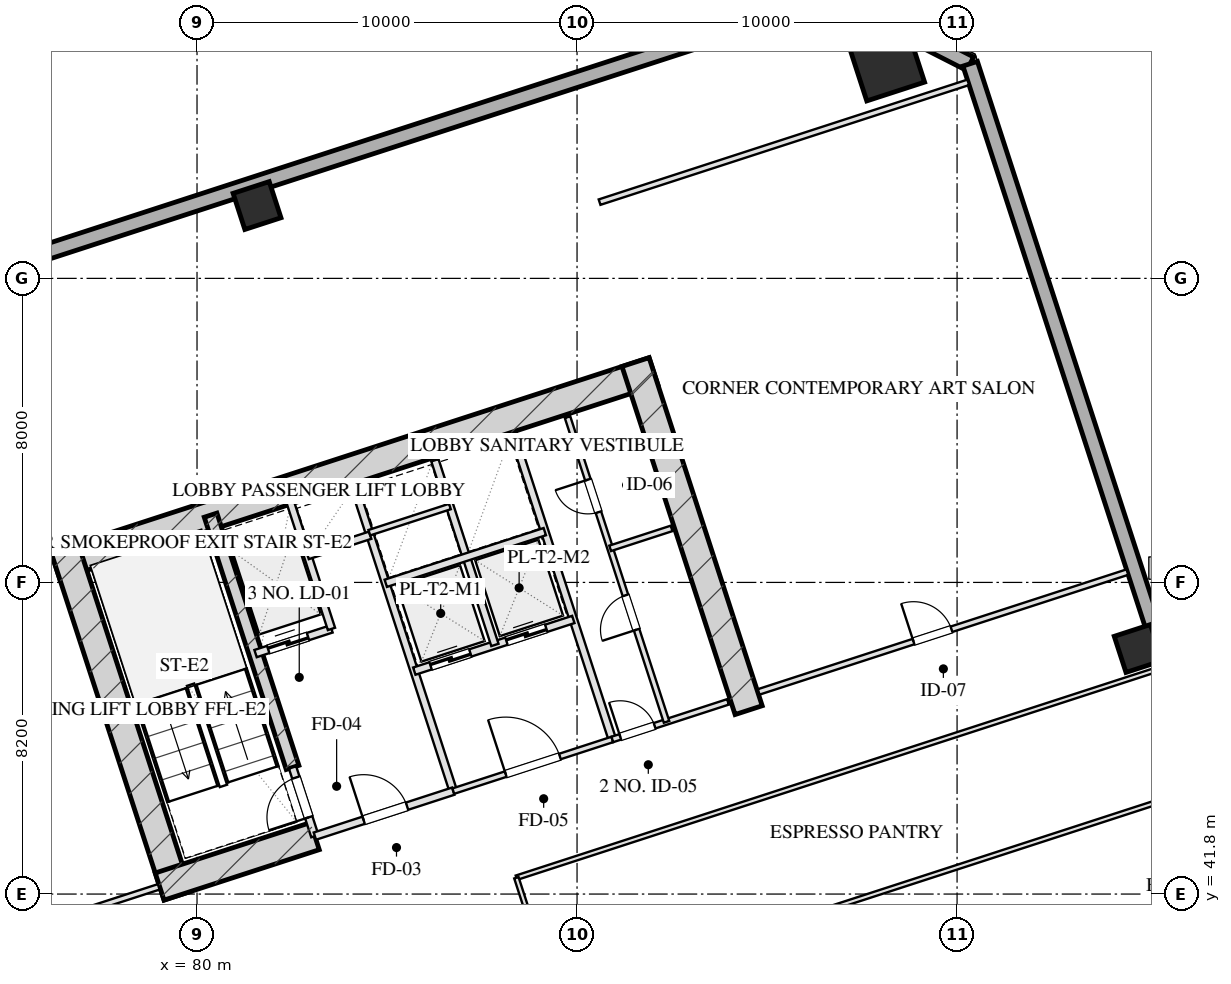
"""IFC4 building model, lengths in metres.
Left out: names, types, materials, properties, quantities, classifications, styles, units other than length and angle.
Written with IfcOpenShell. Run it as: python <this file> out.ifc"""

import sys

from ifc_helpers import new_model, si_unit, direction, frame, frame_2d, origin, origin_2d, place, context, subcontext, project, spatial, rectangle, hollow_rectangle, extrude, element, fill, save


model = new_model("IFC4")
c1 = context("Model", 3, precision=1e-05, world=origin(), true_north=direction((0.0, 1.0)))
c2 = subcontext(c1, "Body", "Model", "MODEL_VIEW")
j1 = project(units=[si_unit("LENGTHUNIT", "METRE"), si_unit("PLANEANGLEUNIT", "RADIAN")], contexts=[c1])
p1 = place(None, origin())
s1 = spatial("IfcSite", under=j1, at=p1, CompositionType="ELEMENT")
p2 = place(p1, origin())
s2 = spatial("IfcBuilding", under=s1, at=p2, CompositionType="ELEMENT")
p3 = place(p2, frame((0.0, 0.0, 57.5)))
s3 = spatial("IfcBuildingStorey", under=s2, at=p3, CompositionType="ELEMENT", Elevation=57.5)
p4 = place(p3, frame((76.272, 50.443, 0.0), z_axis=(0.0, 0.0, 1.0), x_axis=(0.951056072937, 0.309018358888, 0.0)))
e1 = element("IfcWall", 1, at=p4, inside=s3, PredefinedType="SHEAR", context=c2, shape_type="SweptSolid", body=[
    extrude(rectangle(XDim=16.55, YDim=0.75, at=frame_2d((8.275, 0.0))), origin(), (0.0, 0.0, 1.0), 3.45),
])
for number, where, z_axis, x_axis in (
    (2, (79.489, 41.756, 0.0), (0.0, 0.0, 1.0), (-0.309, 0.951, 0.0)),
    (3, (94.515, 46.639, 0.0), (0.0, 0.0, 1.0), (-0.309, 0.951, 0.0)),
):
    element("IfcWall", number, at=place(p3, frame(where, z_axis=z_axis, x_axis=x_axis)), inside=s3, PredefinedType="SHEAR", context=c2, shape_type="SweptSolid", body=[
        extrude(rectangle(XDim=9.63, YDim=0.75, at=frame_2d((4.815, 0.0))), origin(), (0.0, 0.0, 1.0), 3.45),
    ])
p5 = place(p3, frame((82.514, 45.131, 0.0), z_axis=(0.0, 0.0, 1.0), x_axis=(-0.308988790936, 0.951065679686, 0.0)))
e4 = element("IfcWall", 4, at=p5, inside=s3, PredefinedType="SHEAR", context=c2, shape_type="SweptSolid", body=[
    extrude(rectangle(XDim=6.98, YDim=0.35, at=frame_2d((3.49, 0.0))), origin(), (0.0, 0.0, 1.0), 3.45),
])
p6 = place(p3, frame((79.016, 41.997, 0.0), z_axis=(0.0, 0.0, 1.0), x_axis=(0.95106038264, 0.309005094736, 0.0)))
e5 = element("IfcWall", 5, at=p6, inside=s3, PredefinedType="SHEAR", context=c2, shape_type="SweptSolid", body=[
    extrude(rectangle(XDim=4.295, YDim=0.75, at=frame_2d((2.147, 0.0))), origin(), (0.0, 0.0, 1.0), 3.45),
])
p7 = place(p3, frame((98.137, 63.677, 0.0), z_axis=(0.0, 0.0, 1.0), x_axis=(0.951056516295, 0.309016994375, 0.0)))
e6 = element("IfcColumn", 6, at=p7, inside=s3, PredefinedType="COLUMN", context=c2, shape_type="SweptSolid", body=[
    extrude(hollow_rectangle(XDim=1.6, YDim=1.6, WallThickness=0.055, at=origin_2d()), origin(), (0.0, 0.0, 1.0), 3.451),
])
for number, where, z_axis, x_axis in (
    (7, (104.766, 48.261, 0.0), (0.0, 0.0, 1.0), (0.951, 0.309, 0.0)),
    (8, (81.579, 59.916, 0.0), (0.0, 0.0, 1.0), (0.951, 0.309, 0.0)),
):
    element("IfcColumn", number, at=place(p3, frame(where, z_axis=z_axis, x_axis=x_axis)), inside=s3, PredefinedType="COLUMN", context=c2, shape_type="SweptSolid", body=[
        extrude(hollow_rectangle(XDim=1.0, YDim=1.0, WallThickness=0.036, at=origin_2d()), origin(), (0.0, 0.0, 1.0), 3.451),
    ])
p8 = place(p3, frame((79.655, 4.352, 0.0), z_axis=(0.0, 0.0, 1.0), x_axis=(-0.309014526607, 0.951057318118, 0.0)))
e9 = element("IfcWall", 9, at=p8, inside=s3, PredefinedType="SOLIDWALL", context=c2, shape_type="SweptSolid", body=[
    extrude(rectangle(XDim=50.0, YDim=0.4, at=frame_2d((25.0, 0.0))), origin(), (0.0, 0.0, 1.0), 2.61),
])
p9 = place(p8, frame((17.35, 0.0, 0.75)))
e10 = element("IfcOpeningElement", 10, at=p9, cuts=e9, PredefinedType="OPENING", context=c2, shape_type="SweptSolid", body=[
    extrude(rectangle(XDim=2.5, YDim=1.46, at=frame_2d((1.25, 0.73))), frame((0.0, 0.21, 0.0), z_axis=(0.0, -1.0, 0.0), x_axis=(1.0, 0.0, 0.0)), (0.0, 0.0, 1.0), 0.42),
])
p10 = place(p8, frame((30.25, 0.0, 0.0)))
e11 = element("IfcOpeningElement", 11, at=p10, cuts=e9, PredefinedType="OPENING", context=c2, shape_type="SweptSolid", body=[
    extrude(rectangle(XDim=1.1, YDim=2.15, at=frame_2d((0.55, 1.075))), frame((0.0, 0.21, 0.0), z_axis=(0.0, -1.0, 0.0), x_axis=(1.0, 0.0, 0.0)), (0.0, 0.0, 1.0), 0.42),
])
p11 = place(p3, frame((66.002, 55.433, 0.0), z_axis=(0.0, 0.0, 1.0), x_axis=(0.951055939317, 0.309018770125, 0.0)))
e12 = element("IfcWall", 12, at=p11, inside=s3, PredefinedType="SOLIDWALL", context=c2, shape_type="SweptSolid", body=[
    extrude(rectangle(XDim=32.4, YDim=0.4, at=frame_2d((16.2, 0.0))), origin(), (0.0, 0.0, 1.0), 2.61),
])
p12 = place(p3, frame((96.816, 65.446, 0.0), z_axis=(0.0, 0.0, 1.0), x_axis=(0.890998089617, -0.454007053137, 0.0)))
e13 = element("IfcWall", 13, at=p12, inside=s3, PredefinedType="SOLIDWALL", context=c2, shape_type="SweptSolid", body=[
    extrude(rectangle(XDim=3.96, YDim=0.4, at=frame_2d((1.98, 0.0))), origin(), (0.0, 0.0, 1.0), 2.61),
])
p13 = place(p3, frame((100.345, 63.648, 0.0), z_axis=(0.0, 0.0, 1.0), x_axis=(0.309014526607, -0.951057318118, 0.0)))
e14 = element("IfcWall", 14, at=p13, inside=s3, PredefinedType="SOLIDWALL", context=c2, shape_type="SweptSolid", body=[
    extrude(rectangle(XDim=50.0, YDim=0.4, at=frame_2d((25.0, 0.0))), origin(), (0.0, 0.0, 1.0), 2.61),
])
p14 = place(p13, frame((21.85, 0.0, 0.0)))
e15 = element("IfcOpeningElement", 15, at=p14, cuts=e14, PredefinedType="OPENING", context=c2, shape_type="SweptSolid", body=[
    extrude(rectangle(XDim=1.1, YDim=2.15, at=frame_2d((0.55, 1.075))), frame((0.0, 0.21, 0.0), z_axis=(0.0, -1.0, 0.0), x_axis=(1.0, 0.0, 0.0)), (0.0, 0.0, 1.0), 0.42),
])
p15 = place(p3, frame((83.101, 43.324, 0.0), z_axis=(0.0, 0.0, 1.0), x_axis=(-0.309048298632, 0.951046344356, 0.0)))
e16 = element("IfcWall", 16, at=p15, inside=s3, PredefinedType="PARTITIONING", context=c2, shape_type="SweptSolid", body=[
    extrude(rectangle(XDim=1.9, YDim=0.2, at=frame_2d((0.95, 0.0))), origin(), (0.0, 0.0, 1.0), 3.175),
])
p16 = place(p15, frame((0.52, 0.0, 0.0)))
e17 = element("IfcOpeningElement", 17, at=p16, cuts=e16, PredefinedType="OPENING", context=c2, shape_type="SweptSolid", body=[
    extrude(rectangle(XDim=1.1, YDim=2.05, at=frame_2d((0.55, 1.025))), frame((0.0, 0.11, 0.0), z_axis=(0.0, -1.0, 0.0), x_axis=(1.0, 0.0, 0.0)), (0.0, 0.0, 1.0), 0.22),
])
p17 = place(p3, frame((86.743, 44.508, 0.0), z_axis=(0.0, 0.0, 1.0), x_axis=(-0.309016001439, 0.951056838919, 0.0)))
e18 = element("IfcWall", 18, at=p17, inside=s3, PredefinedType="PARTITIONING", context=c2, shape_type="SweptSolid", body=[
    extrude(rectangle(XDim=8.43, YDim=0.2, at=frame_2d((4.215, 0.0))), origin(), (0.0, 0.0, 1.0), 3.175),
])
p18 = place(p3, frame((83.101, 43.324, 0.0), z_axis=(0.0, 0.0, 1.0), x_axis=(0.951052804469, 0.309028417967, 0.0)))
e19 = element("IfcWall", 19, at=p18, inside=s3, PredefinedType="PARTITIONING", context=c2, shape_type="SweptSolid", body=[
    extrude(rectangle(XDim=3.83, YDim=0.2, at=frame_2d((1.915, 0.0))), origin(), (0.0, 0.0, 1.0), 3.175),
])
p19 = place(p18, frame((1.35, 0.0, 0.0)))
e20 = element("IfcOpeningElement", 20, at=p19, cuts=e19, PredefinedType="OPENING", context=c2, shape_type="SweptSolid", body=[
    extrude(rectangle(XDim=1.2, YDim=2.05, at=frame_2d((0.6, 1.025))), frame((0.0, 0.11, 0.0), z_axis=(0.0, -1.0, 0.0), x_axis=(1.0, 0.0, 0.0)), (0.0, 0.0, 1.0), 0.22),
])
p20 = place(p3, frame((81.54, 48.127, 0.0), z_axis=(0.0, 0.0, 1.0), x_axis=(0.951062257173, 0.308999325213, 0.0)))
e21 = element("IfcWall", 21, at=p20, inside=s3, PredefinedType="PARTITIONING", context=c2, shape_type="SweptSolid", body=[
    extrude(rectangle(XDim=2.1, YDim=0.2, at=frame_2d((1.05, 0.0))), origin(), (0.0, 0.0, 1.0), 3.175),
])
p21 = place(p20, frame((0.35, 0.0, 0.0)))
e22 = element("IfcOpeningElement", 22, at=p21, cuts=e21, PredefinedType="OPENING", context=c2, shape_type="SweptSolid", body=[
    extrude(rectangle(XDim=1.1, YDim=2.05, at=frame_2d((0.55, 1.025))), frame((0.0, 0.11, 0.0), z_axis=(0.0, -1.0, 0.0), x_axis=(1.0, 0.0, 0.0)), (0.0, 0.0, 1.0), 0.22),
])
p22 = place(p3, frame((83.538, 48.776, 0.0), z_axis=(0.0, 0.0, 1.0), x_axis=(-0.3089935693, 0.951064127245, 0.0)))
e23 = element("IfcWall", 23, at=p22, inside=s3, PredefinedType="PARTITIONING", context=c2, shape_type="SweptSolid", body=[
    extrude(rectangle(XDim=3.7, YDim=0.2, at=frame_2d((1.85, 0.0))), origin(), (0.0, 0.0, 1.0), 3.175),
])
p23 = place(p3, frame((82.91, 50.707, 0.0), z_axis=(0.0, 0.0, 1.0), x_axis=(0.951041328149, 0.309063734775, 0.0)))
e24 = element("IfcWall", 24, at=p23, inside=s3, PredefinedType="PARTITIONING", context=c2, shape_type="SweptSolid", body=[
    extrude(rectangle(XDim=1.73, YDim=0.2, at=frame_2d((0.865, 0.0))), origin(), (0.0, 0.0, 1.0), 3.175),
])
p24 = place(p3, frame((90.928, 45.868, 0.0), z_axis=(0.0, 0.0, 1.0), x_axis=(-0.309042196757, 0.951048327176, 0.0)))
e25 = element("IfcWall", 25, at=p24, inside=s3, PredefinedType="PARTITIONING", context=c2, shape_type="SweptSolid", body=[
    extrude(rectangle(XDim=8.43, YDim=0.2, at=frame_2d((4.215, 0.0))), origin(), (0.0, 0.0, 1.0), 3.175),
])
p25 = place(p3, frame((86.743, 44.508, 0.0), z_axis=(0.0, 0.0, 1.0), x_axis=(0.951063829732, 0.308994485023, 0.0)))
e26 = element("IfcWall", 26, at=p25, inside=s3, PredefinedType="PARTITIONING", context=c2, shape_type="SweptSolid", body=[
    extrude(rectangle(XDim=4.4, YDim=0.15, at=frame_2d((2.2, 0.0))), origin(), (0.0, 0.0, 1.0), 3.175),
])
p26 = place(p25, frame((1.45, 0.0, 0.0)))
e27 = element("IfcOpeningElement", 27, at=p26, cuts=e26, PredefinedType="OPENING", context=c2, shape_type="SweptSolid", body=[
    extrude(rectangle(XDim=1.5, YDim=2.05, at=frame_2d((0.75, 1.025))), frame((0.0, 0.085, 0.0), z_axis=(0.0, -1.0, 0.0), x_axis=(1.0, 0.0, 0.0)), (0.0, 0.0, 1.0), 0.17),
])
p27 = place(p3, frame((85.718, 47.666, 0.0), z_axis=(0.0, 0.0, 1.0), x_axis=(0.951058531764, 0.30901079133, 0.0)))
e28 = element("IfcWall", 28, at=p27, inside=s3, PredefinedType="PARTITIONING", context=c2, shape_type="SweptSolid", body=[
    extrude(rectangle(XDim=4.4, YDim=0.2, at=frame_2d((2.2, 0.0))), origin(), (0.0, 0.0, 1.0), 3.175),
])
p28 = place(p27, frame((0.45, 0.0, 0.0)))
e29 = element("IfcOpeningElement", 29, at=p28, cuts=e28, PredefinedType="OPENING", context=c2, shape_type="SweptSolid", body=[
    extrude(rectangle(XDim=1.1, YDim=2.05, at=frame_2d((0.55, 1.025))), frame((0.0, 0.11, 0.0), z_axis=(0.0, -1.0, 0.0), x_axis=(1.0, 0.0, 0.0)), (0.0, 0.0, 1.0), 0.22),
])
p29 = place(p27, frame((2.55, 0.0, 0.0)))
e30 = element("IfcOpeningElement", 30, at=p29, cuts=e28, PredefinedType="OPENING", context=c2, shape_type="SweptSolid", body=[
    extrude(rectangle(XDim=1.1, YDim=2.05, at=frame_2d((0.55, 1.025))), frame((0.0, 0.11, 0.0), z_axis=(0.0, -1.0, 0.0), x_axis=(1.0, 0.0, 0.0)), (0.0, 0.0, 1.0), 0.22),
])
p30 = place(p3, frame((87.838, 48.354, 0.0), z_axis=(0.0, 0.0, 1.0), x_axis=(-0.3090093719, 0.951058992953, 0.0)))
e31 = element("IfcWall", 31, at=p30, inside=s3, PredefinedType="PARTITIONING", context=c2, shape_type="SweptSolid", body=[
    extrude(rectangle(XDim=5.11, YDim=0.2, at=frame_2d((2.555, 0.0))), origin(), (0.0, 0.0, 1.0), 3.175),
])
p31 = place(p3, frame((84.967, 49.977, 0.0), z_axis=(0.0, 0.0, 1.0), x_axis=(0.951063829732, 0.308994485023, 0.0)))
e32 = element("IfcWall", 32, at=p31, inside=s3, PredefinedType="PARTITIONING", context=c2, shape_type="SweptSolid", body=[
    extrude(rectangle(XDim=4.4, YDim=0.2, at=frame_2d((2.2, 0.0))), origin(), (0.0, 0.0, 1.0), 3.175),
])
p32 = place(p3, frame((84.534, 51.308, 0.0), z_axis=(0.0, 0.0, 1.0), x_axis=(0.951075093106, 0.308959814982, 0.0)))
e33 = element("IfcWall", 33, at=p32, inside=s3, PredefinedType="PARTITIONING", context=c2, shape_type="SweptSolid", body=[
    extrude(rectangle(XDim=2.23, YDim=0.15, at=frame_2d((1.115, 0.0))), origin(), (0.0, 0.0, 1.0), 3.175),
])
p33 = place(p3, frame((90.928, 45.868, 0.0), z_axis=(0.0, 0.0, 1.0), x_axis=(0.951059297078, 0.309008435874, 0.0)))
e34 = element("IfcWall", 34, at=p33, inside=s3, PredefinedType="PARTITIONING", context=c2, shape_type="SweptSolid", body=[
    extrude(rectangle(XDim=3.2, YDim=0.15, at=frame_2d((1.6, 0.0))), origin(), (0.0, 0.0, 1.0), 3.175),
])
p34 = place(p33, frame((0.22, 0.0, 0.0)))
e35 = element("IfcOpeningElement", 35, at=p34, cuts=e34, PredefinedType="OPENING", context=c2, shape_type="SweptSolid", body=[
    extrude(rectangle(XDim=0.95, YDim=2.05, at=frame_2d((0.475, 1.025))), frame((0.0, 0.085, 0.0), z_axis=(0.0, -1.0, 0.0), x_axis=(1.0, 0.0, 0.0)), (0.0, 0.0, 1.0), 0.17),
])
p35 = place(p3, frame((92.355, 46.331, 0.0), z_axis=(0.0, 0.0, 1.0), x_axis=(-0.309007490203, 0.951059604335, 0.0)))
e36 = element("IfcWall", 36, at=p35, inside=s3, PredefinedType="PARTITIONING", context=c2, shape_type="SweptSolid", body=[
    extrude(rectangle(XDim=8.43, YDim=0.15, at=frame_2d((4.215, 0.0))), origin(), (0.0, 0.0, 1.0), 3.175),
])
p36 = place(p35, frame((2.55, 0.0, 0.0)))
e37 = element("IfcOpeningElement", 37, at=p36, cuts=e36, PredefinedType="OPENING", context=c2, shape_type="SweptSolid", body=[
    extrude(rectangle(XDim=0.95, YDim=2.05, at=frame_2d((0.475, 1.025))), frame((0.0, 0.085, 0.0), z_axis=(0.0, -1.0, 0.0), x_axis=(1.0, 0.0, 0.0)), (0.0, 0.0, 1.0), 0.17),
])
p37 = place(p35, frame((5.8, 0.0, 0.0)))
e38 = element("IfcOpeningElement", 38, at=p37, cuts=e36, PredefinedType="OPENING", context=c2, shape_type="SweptSolid", body=[
    extrude(rectangle(XDim=0.9, YDim=2.05, at=frame_2d((0.45, 1.025))), frame((0.0, 0.085, 0.0), z_axis=(0.0, -1.0, 0.0), x_axis=(1.0, 0.0, 0.0)), (0.0, 0.0, 1.0), 0.17),
])
p38 = place(p3, frame((90.871, 50.896, 0.0), z_axis=(0.0, 0.0, 1.0), x_axis=(0.951054116971, 0.309024378638, 0.0)))
e39 = element("IfcWall", 39, at=p38, inside=s3, PredefinedType="PARTITIONING", context=c2, shape_type="SweptSolid", body=[
    extrude(rectangle(XDim=1.7, YDim=0.15, at=frame_2d((0.85, 0.0))), origin(), (0.0, 0.0, 1.0), 3.175),
])
p39 = place(p3, frame((68.721, 38.652, 0.0), z_axis=(0.0, 0.0, 1.0), x_axis=(0.951056658866, 0.309016555588, 0.0)))
e40 = element("IfcWall", 40, at=p39, inside=s3, PredefinedType="PARTITIONING", context=c2, shape_type="SweptSolid", body=[
    extrude(rectangle(XDim=10.8, YDim=0.15, at=frame_2d((5.4, 0.0))), origin(), (0.0, 0.0, 1.0), 3.175),
])
p40 = place(p39, frame((4.536, 0.0, 0.0)))
e41 = element("IfcOpeningElement", 41, at=p40, cuts=e40, PredefinedType="OPENING", context=c2, shape_type="SweptSolid", body=[
    extrude(rectangle(XDim=1.0, YDim=2.05, at=frame_2d((0.5, 1.025))), frame((0.0, 0.085, 0.0), z_axis=(0.0, -1.0, 0.0), x_axis=(1.0, 0.0, 0.0)), (0.0, 0.0, 1.0), 0.17),
])
p41 = place(p3, frame((90.593, 60.006, 0.0), z_axis=(0.0, 0.0, 1.0), x_axis=(0.951059043131, 0.309009217467, 0.0)))
e42 = element("IfcWall", 42, at=p41, inside=s3, PredefinedType="PARTITIONING", context=c2, shape_type="SweptSolid", body=[
    extrude(rectangle(XDim=10.2, YDim=0.15, at=frame_2d((5.1, 0.0))), origin(), (0.0, 0.0, 1.0), 3.175),
])
p42 = place(p3, frame((94.78, 47.119, 0.0), z_axis=(0.0, 0.0, 1.0), x_axis=(0.951054294345, 0.309023832749, 0.0)))
e43 = element("IfcWall", 43, at=p42, inside=s3, PredefinedType="PARTITIONING", context=c2, shape_type="SweptSolid", body=[
    extrude(rectangle(XDim=10.2, YDim=0.15, at=frame_2d((5.1, 0.0))), origin(), (0.0, 0.0, 1.0), 3.175),
])
p43 = place(p42, frame((4.284, 0.0, 0.0)))
e44 = element("IfcOpeningElement", 44, at=p43, cuts=e43, PredefinedType="OPENING", context=c2, shape_type="SweptSolid", body=[
    extrude(rectangle(XDim=1.05, YDim=2.05, at=frame_2d((0.525, 1.025))), frame((0.0, 0.085, 0.0), z_axis=(0.0, -1.0, 0.0), x_axis=(1.0, 0.0, 0.0)), (0.0, 0.0, 1.0), 0.17),
])
p44 = place(p3, frame((88.404, 42.229, 0.0), z_axis=(0.0, 0.0, 1.0), x_axis=(0.951054152931, 0.309024267966, 0.0)))
e45 = element("IfcWall", 45, at=p44, inside=s3, PredefinedType="PARTITIONING", context=c2, shape_type="SweptSolid", body=[
    extrude(rectangle(XDim=17.775, YDim=0.12, at=frame_2d((8.888, 0.0))), origin(), (0.0, 0.0, 1.0), 3.175),
])
p45 = place(p3, frame((93.546, 26.404, 0.0), z_axis=(0.0, 0.0, 1.0), x_axis=(-0.309022042254, 0.951054876125, 0.0)))
e46 = element("IfcWall", 46, at=p45, inside=s3, PredefinedType="PARTITIONING", context=c2, shape_type="SweptSolid", body=[
    extrude(rectangle(XDim=16.64, YDim=0.12, at=frame_2d((8.32, 0.0))), origin(), (0.0, 0.0, 1.0), 3.175),
])
p46 = place(p45, frame((1.16, 0.0, 0.0)))
e47 = element("IfcOpeningElement", 47, at=p46, cuts=e46, PredefinedType="OPENING", context=c2, shape_type="SweptSolid", body=[
    extrude(rectangle(XDim=1.0, YDim=2.05, at=frame_2d((0.5, 1.025))), frame((0.0, 0.07, 0.0), z_axis=(0.0, -1.0, 0.0), x_axis=(1.0, 0.0, 0.0)), (0.0, 0.0, 1.0), 0.14),
])
p47 = place(p45, frame((4.72, 0.0, 0.0)))
e48 = element("IfcOpeningElement", 48, at=p47, cuts=e46, PredefinedType="OPENING", context=c2, shape_type="SweptSolid", body=[
    extrude(rectangle(XDim=1.0, YDim=2.05, at=frame_2d((0.5, 1.025))), frame((0.0, 0.07, 0.0), z_axis=(0.0, -1.0, 0.0), x_axis=(1.0, 0.0, 0.0)), (0.0, 0.0, 1.0), 0.14),
])
p48 = place(p45, frame((7.549, 0.0, 0.0)))
e49 = element("IfcOpeningElement", 49, at=p48, cuts=e46, PredefinedType="OPENING", context=c2, shape_type="SweptSolid", body=[
    extrude(rectangle(XDim=1.0, YDim=2.05, at=frame_2d((0.5, 1.025))), frame((0.0, 0.07, 0.0), z_axis=(0.0, -1.0, 0.0), x_axis=(1.0, 0.0, 0.0)), (0.0, 0.0, 1.0), 0.14),
])
p49 = place(p45, frame((10.148, 0.0, 0.0)))
e50 = element("IfcOpeningElement", 50, at=p49, cuts=e46, PredefinedType="OPENING", context=c2, shape_type="SweptSolid", body=[
    extrude(rectangle(XDim=1.05, YDim=2.05, at=frame_2d((0.525, 1.025))), frame((0.0, 0.07, 0.0), z_axis=(0.0, -1.0, 0.0), x_axis=(1.0, 0.0, 0.0)), (0.0, 0.0, 1.0), 0.14),
])
p50 = place(p45, frame((14.48, 0.0, 0.0)))
e51 = element("IfcOpeningElement", 51, at=p50, cuts=e46, PredefinedType="OPENING", context=c2, shape_type="SweptSolid", body=[
    extrude(rectangle(XDim=1.0, YDim=2.05, at=frame_2d((0.5, 1.025))), frame((0.0, 0.07, 0.0), z_axis=(0.0, -1.0, 0.0), x_axis=(1.0, 0.0, 0.0)), (0.0, 0.0, 1.0), 0.14),
])
p51 = place(p3, frame((89.43, 39.072, 0.0), z_axis=(0.0, 0.0, 1.0), x_axis=(0.951058189574, 0.309011844505, 0.0)))
e52 = element("IfcWall", 52, at=p51, inside=s3, PredefinedType="PARTITIONING", context=c2, shape_type="SweptSolid", body=[
    extrude(rectangle(XDim=17.775, YDim=0.12, at=frame_2d((8.887, 0.0))), origin(), (0.0, 0.0, 1.0), 3.175),
])
p52 = place(p16, origin())
e53 = element("IfcDoor", 53, at=p52, inside=s3, OperationType="SINGLE_SWING_LEFT", PredefinedType="DOOR", context=c2, shape_type="SweptSolid", body=[
    extrude(rectangle(XDim=1.1, YDim=2.05, at=frame_2d((0.55, 1.025))), frame((0.0, 0.025, 0.0), z_axis=(0.0, -1.0, 0.0), x_axis=(1.0, 0.0, 0.0)), (0.0, 0.0, 1.0), 0.05),
])
fill(e17, e53)
p53 = place(p19, origin())
e54 = element("IfcDoor", 54, at=p53, inside=s3, OperationType="SINGLE_SWING_LEFT", PredefinedType="DOOR", context=c2, shape_type="SweptSolid", body=[
    extrude(rectangle(XDim=1.2, YDim=2.05, at=frame_2d((0.6, 1.025))), frame((0.0, 0.025, 0.0), z_axis=(0.0, -1.0, 0.0), x_axis=(1.0, 0.0, 0.0)), (0.0, 0.0, 1.0), 0.05),
])
fill(e20, e54)
p54 = place(p21, origin())
e55 = element("IfcDoor", 55, at=p54, inside=s3, OperationType="DOUBLE_DOOR_SLIDING", PredefinedType="DOOR", context=c2, shape_type="SweptSolid", body=[
    extrude(rectangle(XDim=1.1, YDim=2.05, at=frame_2d((0.55, 1.025))), frame((0.0, 0.025, 0.0), z_axis=(0.0, -1.0, 0.0), x_axis=(1.0, 0.0, 0.0)), (0.0, 0.0, 1.0), 0.05),
])
fill(e22, e55)
p55 = place(p26, origin())
e56 = element("IfcDoor", 56, at=p55, inside=s3, OperationType="SINGLE_SWING_LEFT", PredefinedType="DOOR", context=c2, shape_type="SweptSolid", body=[
    extrude(rectangle(XDim=1.5, YDim=2.05, at=frame_2d((0.75, 1.025))), frame((0.0, 0.025, 0.0), z_axis=(0.0, -1.0, 0.0), x_axis=(1.0, 0.0, 0.0)), (0.0, 0.0, 1.0), 0.05),
])
fill(e27, e56)
p56 = place(p28, origin())
e57 = element("IfcDoor", 57, at=p56, inside=s3, OperationType="DOUBLE_DOOR_SLIDING", PredefinedType="DOOR", context=c2, shape_type="SweptSolid", body=[
    extrude(rectangle(XDim=1.1, YDim=2.05, at=frame_2d((0.55, 1.025))), frame((0.0, 0.025, 0.0), z_axis=(0.0, -1.0, 0.0), x_axis=(1.0, 0.0, 0.0)), (0.0, 0.0, 1.0), 0.05),
])
fill(e29, e57)
p57 = place(p29, origin())
e58 = element("IfcDoor", 58, at=p57, inside=s3, OperationType="DOUBLE_DOOR_SLIDING", PredefinedType="DOOR", context=c2, shape_type="SweptSolid", body=[
    extrude(rectangle(XDim=1.1, YDim=2.05, at=frame_2d((0.55, 1.025))), frame((0.0, 0.025, 0.0), z_axis=(0.0, -1.0, 0.0), x_axis=(1.0, 0.0, 0.0)), (0.0, 0.0, 1.0), 0.05),
])
fill(e30, e58)
p58 = place(p34, origin())
e59 = element("IfcDoor", 59, at=p58, inside=s3, OperationType="SINGLE_SWING_LEFT", PredefinedType="DOOR", context=c2, shape_type="SweptSolid", body=[
    extrude(rectangle(XDim=0.95, YDim=2.05, at=frame_2d((0.475, 1.025))), frame((0.0, 0.025, 0.0), z_axis=(0.0, -1.0, 0.0), x_axis=(1.0, 0.0, 0.0)), (0.0, 0.0, 1.0), 0.05),
])
fill(e35, e59)
p59 = place(p36, origin())
e60 = element("IfcDoor", 60, at=p59, inside=s3, OperationType="SINGLE_SWING_LEFT", PredefinedType="DOOR", context=c2, shape_type="SweptSolid", body=[
    extrude(rectangle(XDim=0.95, YDim=2.05, at=frame_2d((0.475, 1.025))), frame((0.0, 0.025, 0.0), z_axis=(0.0, -1.0, 0.0), x_axis=(1.0, 0.0, 0.0)), (0.0, 0.0, 1.0), 0.05),
])
fill(e37, e60)
p60 = place(p37, origin())
e61 = element("IfcDoor", 61, at=p60, inside=s3, OperationType="SINGLE_SWING_RIGHT", PredefinedType="DOOR", context=c2, shape_type="SweptSolid", body=[
    extrude(rectangle(XDim=0.9, YDim=2.05, at=frame_2d((0.45, 1.025))), frame((0.0, 0.025, 0.0), z_axis=(0.0, -1.0, 0.0), x_axis=(1.0, 0.0, 0.0)), (0.0, 0.0, 1.0), 0.05),
])
fill(e38, e61)
p61 = place(p43, origin())
e62 = element("IfcDoor", 62, at=p61, inside=s3, OperationType="SINGLE_SWING_LEFT", PredefinedType="DOOR", context=c2, shape_type="SweptSolid", body=[
    extrude(rectangle(XDim=1.05, YDim=2.05, at=frame_2d((0.525, 1.025))), frame((0.0, 0.025, 0.0), z_axis=(0.0, -1.0, 0.0), x_axis=(1.0, 0.0, 0.0)), (0.0, 0.0, 1.0), 0.05),
])
fill(e44, e62)
save(model, sys.argv[1])
